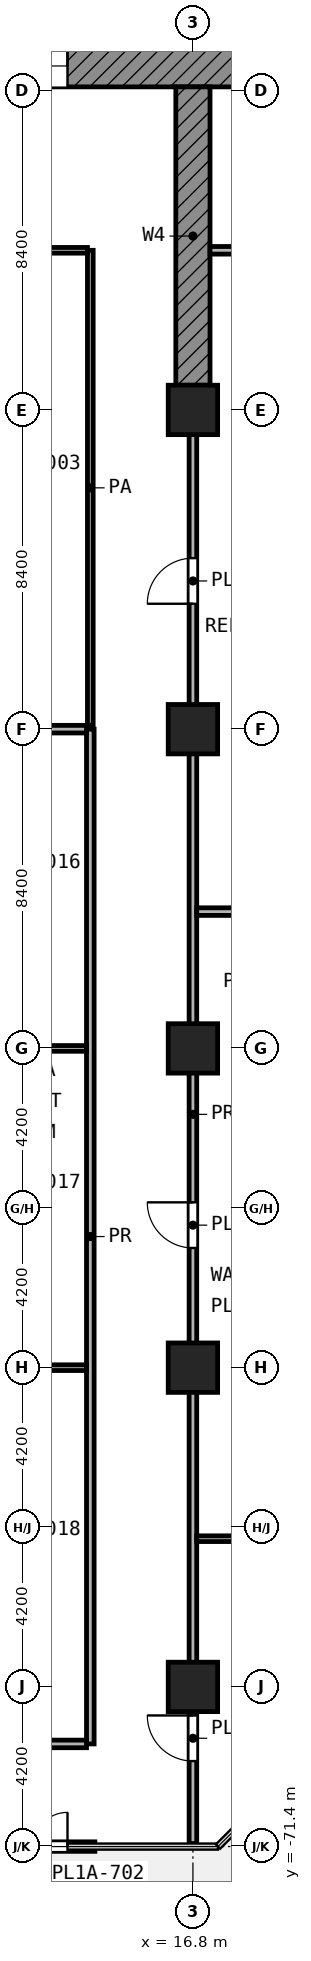
"""IFC4 building model, lengths in metres.
Left out: names, types, materials, properties, quantities, classifications, styles, units other than length and angle.
Written with IfcOpenShell. Run it as: python <this file> out.ifc"""

import sys

from ifc_helpers import new_model, si_unit, direction, frame, frame_2d, origin, origin_2d, place, context, subcontext, project, spatial, rectangle, extrude, element, fill, save


model = new_model("IFC4")
c1 = context("Model", 3, precision=1e-05, world=origin(), true_north=direction((0.0, 1.0)))
c2 = subcontext(c1, "Body", "Model", "MODEL_VIEW")
j1 = project(units=[si_unit("LENGTHUNIT", "METRE"), si_unit("PLANEANGLEUNIT", "RADIAN")], contexts=[c1])
p1 = place(None, origin())
s1 = spatial("IfcSite", under=j1, at=p1, CompositionType="ELEMENT")
p2 = place(p1, origin())
s2 = spatial("IfcBuilding", under=s1, at=p2, CompositionType="ELEMENT")
p3 = place(p2, frame((0.0, 0.0, 34.2)))
s3 = spatial("IfcBuildingStorey", under=s2, at=p3, CompositionType="ELEMENT", Elevation=34.2)
for number, where, z_axis, x_axis in (
    (1, (16.8, -33.6, 0.0), (0.0, 0.0, 1.0), (1.0, 0.0, 0.0)),
    (2, (16.8, -42.0, 0.0), (0.0, 0.0, 1.0), (1.0, 0.0, 0.0)),
    (3, (16.8, -50.4, 0.0), (0.0, 0.0, 1.0), (1.0, 0.0, 0.0)),
    (4, (16.8, -58.8, 0.0), (0.0, 0.0, 1.0), (1.0, 0.0, 0.0)),
    (5, (16.8, -67.2, 0.0), (0.0, 0.0, 1.0), (1.0, 0.0, 0.0)),
):
    element("IfcColumn", number, at=place(p3, frame(where, z_axis=z_axis, x_axis=x_axis)), inside=s3, PredefinedType="COLUMN", context=c2, shape_type="SweptSolid", body=[
        extrude(rectangle(XDim=1.3, YDim=1.3, at=origin_2d()), origin(), (0.0, 0.0, 1.0), 5.0),
    ])
p4 = place(p3, frame((16.8, -25.1, 0.0), z_axis=(0.0, 0.0, 1.0), x_axis=(0.0, -1.0, 0.0)))
e6 = element("IfcWall", 6, at=p4, inside=s3, PredefinedType="SHEAR", context=c2, shape_type="SweptSolid", body=[
    extrude(rectangle(XDim=7.85, YDim=0.9, at=frame_2d((3.925, 0.0))), origin(), (0.0, 0.0, 1.0), 4.58),
])
p5 = place(p3, frame((10.98, -71.401, 0.0), z_axis=(0.0, 0.0, 1.0), x_axis=(1.0, 0.0, 0.0)))
e7 = element("IfcWall", 7, at=p5, inside=s3, PredefinedType="SOLIDWALL", context=c2, shape_type="SweptSolid", body=[
    extrude(rectangle(XDim=3.24, YDim=0.25, at=frame_2d((1.62, 0.0))), origin(), (0.0, 0.0, 1.0), 4.42),
])
p6 = place(p5, frame((0.72, 0.0, 0.0)))
e8 = element("IfcOpeningElement", 8, at=p6, cuts=e7, PredefinedType="OPENING", context=c2, shape_type="SweptSolid", body=[
    extrude(rectangle(XDim=1.8, YDim=2.1, at=frame_2d((0.9, 1.05))), frame((0.0, 0.135, 0.0), z_axis=(0.0, -1.0, 0.0), x_axis=(1.0, 0.0, 0.0)), (0.0, 0.0, 1.0), 0.27),
])
p7 = place(p3, frame((5.4, -24.55, 0.0), z_axis=(0.0, 0.0, 1.0), x_axis=(1.0, 0.0, 0.0)))
e9 = element("IfcWall", 9, at=p7, inside=s3, PredefinedType="SHEAR", context=c2, shape_type="SweptSolid", body=[
    extrude(rectangle(XDim=18.6, YDim=1.1, at=frame_2d((9.3, 0.0))), origin(), (0.0, 0.0, 1.0), 4.58),
])
p8 = place(p7, frame((6.3, 0.0, 0.0)))
e10 = element("IfcOpeningElement", 10, at=p8, cuts=e9, PredefinedType="OPENING", context=c2, shape_type="SweptSolid", body=[
    extrude(rectangle(XDim=1.8, YDim=2.1, at=frame_2d((0.9, 1.05))), frame((0.0, 0.56, 0.0), z_axis=(0.0, -1.0, 0.0), x_axis=(1.0, 0.0, 0.0)), (0.0, 0.0, 1.0), 1.12),
])
p9 = place(p3, frame((16.9, -63.3, 0.0), z_axis=(0.0, 0.0, 1.0), x_axis=(1.0, 0.0, 0.0)))
e11 = element("IfcWall", 11, at=p9, inside=s3, PredefinedType="PARTITIONING", context=c2, shape_type="SweptSolid", body=[
    extrude(rectangle(XDim=4.02, YDim=0.15, at=frame_2d((2.01, 0.0))), origin(), (0.0, 0.0, 1.0), 4.58),
])
for number, where, z_axis, x_axis in (
    (12, (11.2, -58.8, 0.0), (0.0, 0.0, 1.0), (1.0, 0.0, 0.0)),
    (13, (11.2, -50.4, 0.0), (0.0, 0.0, 1.0), (1.0, 0.0, 0.0)),
):
    element("IfcWall", number, at=place(p3, frame(where, z_axis=z_axis, x_axis=x_axis)), inside=s3, PredefinedType="PARTITIONING", context=c2, shape_type="SweptSolid", body=[
        extrude(rectangle(XDim=2.8, YDim=0.15, at=frame_2d((1.4, 0.0))), origin(), (0.0, 0.0, 1.0), 4.58),
    ])
p10 = place(p3, frame((11.178, -29.4, 0.0), z_axis=(0.0, 0.0, 1.0), x_axis=(1.0, 0.0, 0.0)))
e14 = element("IfcWall", 14, at=p10, inside=s3, PredefinedType="PARTITIONING", context=c2, shape_type="SweptSolid", body=[
    extrude(rectangle(XDim=2.847, YDim=0.15, at=frame_2d((1.423, 0.0))), origin(), (0.0, 0.0, 1.0), 4.58),
])
p11 = place(p3, frame((14.1, -41.9, 0.0), z_axis=(0.0, 0.0, 1.0), x_axis=(0.0, 1.0, 0.0)))
e15 = element("IfcWall", 15, at=p11, inside=s3, PredefinedType="PARTITIONING", context=c2, shape_type="SweptSolid", body=[
    extrude(rectangle(XDim=12.5, YDim=0.15, at=frame_2d((6.25, 0.0))), origin(), (0.0, 0.0, 1.0), 4.58),
])
p12 = place(p3, frame((11.203, -68.7, 0.0), z_axis=(0.0, 0.0, 1.0), x_axis=(1.0, 0.0, 0.0)))
e16 = element("IfcWall", 16, at=p12, inside=s3, PredefinedType="PARTITIONING", context=c2, shape_type="SweptSolid", body=[
    extrude(rectangle(XDim=2.797, YDim=0.2, at=frame_2d((1.398, 0.0))), origin(), (0.0, 0.0, 1.0), 4.58),
])
p13 = place(p3, frame((16.9, -46.8, 0.0), z_axis=(0.0, 0.0, 1.0), x_axis=(1.0, 0.0, 0.0)))
e17 = element("IfcWall", 17, at=p13, inside=s3, PredefinedType="PARTITIONING", context=c2, shape_type="SweptSolid", body=[
    extrude(rectangle(XDim=4.02, YDim=0.2, at=frame_2d((2.01, 0.0))), origin(), (0.0, 0.0, 1.0), 4.58),
])
p14 = place(p3, frame((11.2, -42.0, 0.0), z_axis=(0.0, 0.0, 1.0), x_axis=(1.0, 0.0, 0.0)))
e18 = element("IfcWall", 18, at=p14, inside=s3, PredefinedType="PARTITIONING", context=c2, shape_type="SweptSolid", body=[
    extrude(rectangle(XDim=2.8, YDim=0.2, at=frame_2d((1.4, 0.0))), origin(), (0.0, 0.0, 1.0), 4.58),
])
p15 = place(p3, frame((17.249, -29.4, 0.0), z_axis=(0.0, 0.0, 1.0), x_axis=(1.0, 0.0, 0.0)))
e19 = element("IfcWall", 19, at=p15, inside=s3, PredefinedType="PARTITIONING", context=c2, shape_type="SweptSolid", body=[
    extrude(rectangle(XDim=3.698, YDim=0.2, at=frame_2d((1.849, 0.0))), origin(), (0.0, 0.0, 1.0), 4.58),
])
p16 = place(p3, frame((14.1, -68.7, 0.0), z_axis=(0.0, 0.0, 1.0), x_axis=(0.0, 1.0, 0.0)))
e20 = element("IfcWall", 20, at=p16, inside=s3, PredefinedType="PARTITIONING", context=c2, shape_type="SweptSolid", body=[
    extrude(rectangle(XDim=26.7, YDim=0.2, at=frame_2d((13.35, 0.0))), origin(), (0.0, 0.0, 1.0), 4.58),
])
p17 = place(p3, frame((16.8, -71.321, 0.0), z_axis=(0.0, 0.0, 1.0), x_axis=(0.0, 1.0, 0.0)))
e21 = element("IfcWall", 21, at=p17, inside=s3, PredefinedType="PARTITIONING", context=c2, shape_type="SweptSolid", body=[
    extrude(rectangle(XDim=38.371, YDim=0.2, at=frame_2d((19.186, 0.0))), origin(), (0.0, 0.0, 1.0), 4.58),
])
p18 = place(p17, frame((32.621, 0.0, 0.0)))
e22 = element("IfcOpeningElement", 22, at=p18, cuts=e21, PredefinedType="OPENING", context=c2, shape_type="SweptSolid", body=[
    extrude(rectangle(XDim=1.2, YDim=2.1, at=frame_2d((0.6, 1.05))), frame((0.0, 0.11, 0.0), z_axis=(0.0, -1.0, 0.0), x_axis=(1.0, 0.0, 0.0)), (0.0, 0.0, 1.0), 0.22),
])
p19 = place(p17, frame((15.671, 0.0, 0.0)))
e23 = element("IfcOpeningElement", 23, at=p19, cuts=e21, PredefinedType="OPENING", context=c2, shape_type="SweptSolid", body=[
    extrude(rectangle(XDim=1.2, YDim=2.1, at=frame_2d((0.6, 1.05))), frame((0.0, 0.11, 0.0), z_axis=(0.0, -1.0, 0.0), x_axis=(1.0, 0.0, 0.0)), (0.0, 0.0, 1.0), 0.22),
])
p20 = place(p17, frame((2.17, 0.0, 0.0)))
e24 = element("IfcOpeningElement", 24, at=p20, cuts=e21, PredefinedType="OPENING", context=c2, shape_type="SweptSolid", body=[
    extrude(rectangle(XDim=1.2, YDim=2.1, at=frame_2d((0.6, 1.05))), frame((0.0, 0.11, 0.0), z_axis=(0.0, -1.0, 0.0), x_axis=(1.0, 0.0, 0.0)), (0.0, 0.0, 1.0), 0.22),
])
p21 = place(p6, origin())
e25 = element("IfcDoor", 25, at=p21, inside=s3, OperationType="DOUBLE_DOOR_SINGLE_SWING", PredefinedType="DOOR", context=c2, shape_type="SweptSolid", body=[
    extrude(rectangle(XDim=1.8, YDim=2.1, at=frame_2d((0.9, 1.05))), frame((0.0, 0.025, 0.0), z_axis=(0.0, -1.0, 0.0), x_axis=(1.0, 0.0, 0.0)), (0.0, 0.0, 1.0), 0.05),
])
fill(e8, e25)
p22 = place(p8, origin())
e26 = element("IfcDoor", 26, at=p22, inside=s3, OperationType="DOUBLE_DOOR_SINGLE_SWING", PredefinedType="DOOR", context=c2, shape_type="SweptSolid", body=[
    extrude(rectangle(XDim=1.8, YDim=2.1, at=frame_2d((0.9, 1.05))), frame((0.0, 0.025, 0.0), z_axis=(0.0, -1.0, 0.0), x_axis=(1.0, 0.0, 0.0)), (0.0, 0.0, 1.0), 0.05),
])
fill(e10, e26)
p23 = place(p18, origin())
e27 = element("IfcDoor", 27, at=p23, inside=s3, OperationType="SINGLE_SWING_LEFT", PredefinedType="DOOR", context=c2, shape_type="SweptSolid", body=[
    extrude(rectangle(XDim=1.2, YDim=2.1, at=frame_2d((0.6, 1.05))), frame((0.0, 0.025, 0.0), z_axis=(0.0, -1.0, 0.0), x_axis=(1.0, 0.0, 0.0)), (0.0, 0.0, 1.0), 0.05),
])
fill(e22, e27)
p24 = place(p19, origin())
e28 = element("IfcDoor", 28, at=p24, inside=s3, OperationType="SINGLE_SWING_RIGHT", PredefinedType="DOOR", context=c2, shape_type="SweptSolid", body=[
    extrude(rectangle(XDim=1.2, YDim=2.1, at=frame_2d((0.6, 1.05))), frame((0.0, 0.025, 0.0), z_axis=(0.0, -1.0, 0.0), x_axis=(1.0, 0.0, 0.0)), (0.0, 0.0, 1.0), 0.05),
])
fill(e23, e28)
p25 = place(p20, origin())
e29 = element("IfcDoor", 29, at=p25, inside=s3, OperationType="SINGLE_SWING_RIGHT", PredefinedType="DOOR", context=c2, shape_type="SweptSolid", body=[
    extrude(rectangle(XDim=1.2, YDim=2.1, at=frame_2d((0.6, 1.05))), frame((0.0, 0.025, 0.0), z_axis=(0.0, -1.0, 0.0), x_axis=(1.0, 0.0, 0.0)), (0.0, 0.0, 1.0), 0.05),
])
fill(e24, e29)
save(model, sys.argv[1])
